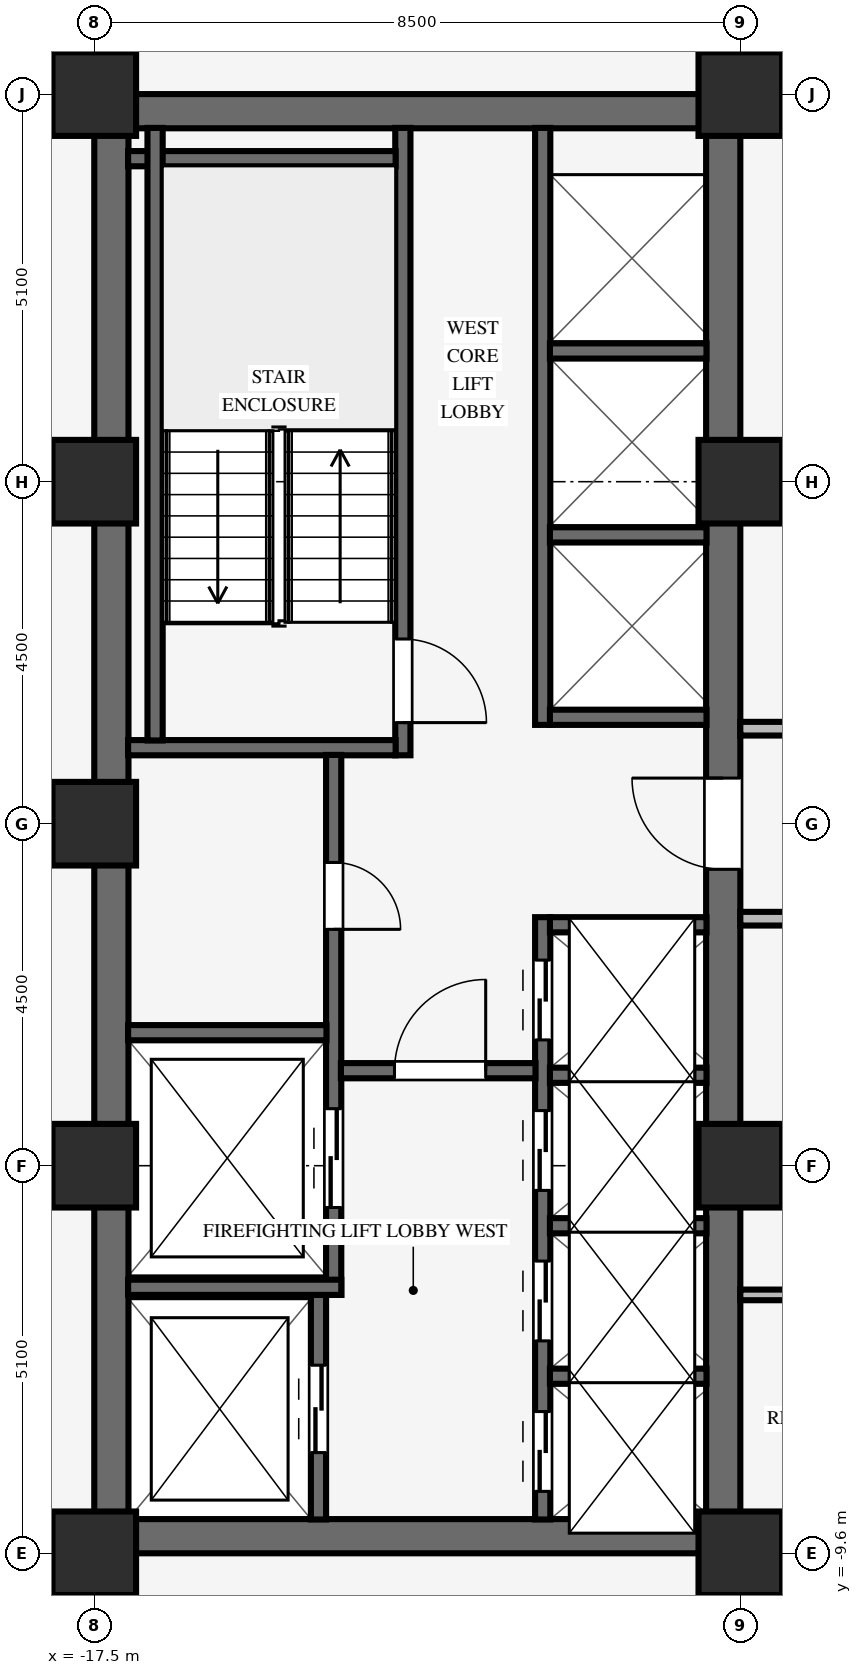
"""IFC4 building model, lengths in metres.
Left out: names, types, materials, properties, quantities, classifications, styles, units other than length and angle.
Written with IfcOpenShell. Run it as: python <this file> out.ifc"""

import sys

from ifc_helpers import new_model, si_unit, direction, frame, frame_2d, origin, origin_2d, place, context, subcontext, project, spatial, rectangle, extrude, source, transform, mapped, element, fill, save


model = new_model("IFC4")
c1 = context("Model", 3, precision=1e-05, world=origin(), true_north=direction((0.0, 1.0)))
c2 = subcontext(c1, "Body", "Model", "MODEL_VIEW")
j1 = project(units=[si_unit("LENGTHUNIT", "METRE"), si_unit("PLANEANGLEUNIT", "RADIAN")], contexts=[c1])
p1 = place(None, origin())
s1 = spatial("IfcSite", under=j1, at=p1, CompositionType="ELEMENT")
p2 = place(p1, origin())
s2 = spatial("IfcBuilding", under=s1, at=p2, CompositionType="ELEMENT")
p3 = place(p2, frame((0.0, 0.0, 56.8)))
s3 = spatial("IfcBuildingStorey", under=s2, at=p3, CompositionType="ELEMENT", Elevation=56.8)
for number, where, z_axis, x_axis in (
    (1, (-17.5, -9.375, 0.0), (0.0, 0.0, 1.0), (1.0, 0.0, 0.0)),
    (2, (-17.5, 9.375, 0.0), (0.0, 0.0, 1.0), (1.0, 0.0, 0.0)),
):
    element("IfcWall", number, at=place(p3, frame(where, z_axis=z_axis, x_axis=x_axis)), inside=s3, PredefinedType="SHEAR", context=c2, shape_type="SweptSolid", body=[
        extrude(rectangle(XDim=8.5, YDim=0.45, at=frame_2d((4.25, 0.0))), origin(), (0.0, 0.0, 1.0), 3.37),
    ])
p4 = place(p3, frame((-17.275, -9.155, 0.0), z_axis=(0.0, 0.0, 1.0), x_axis=(0.0, 1.0, 0.0)))
e3 = element("IfcWall", 3, at=p4, inside=s3, PredefinedType="SHEAR", context=c2, shape_type="SweptSolid", body=[
    extrude(rectangle(XDim=18.31, YDim=0.45, at=frame_2d((9.155, 0.0))), origin(), (0.0, 0.0, 1.0), 3.37),
])
p5 = place(p3, frame((-9.225, -9.155, 0.0), z_axis=(0.0, 0.0, 1.0), x_axis=(0.0, 1.0, 0.0)))
e4 = element("IfcWall", 4, at=p5, inside=s3, PredefinedType="SHEAR", context=c2, shape_type="SweptSolid", body=[
    extrude(rectangle(XDim=18.31, YDim=0.45, at=frame_2d((9.155, 0.0))), origin(), (0.0, 0.0, 1.0), 3.37),
])
p6 = place(p5, frame((8.555, 0.0, 0.0)))
e5 = element("IfcOpeningElement", 5, at=p6, cuts=e4, PredefinedType="OPENING", context=c2, shape_type="SweptSolid", body=[
    extrude(rectangle(XDim=1.2, YDim=2.15, at=frame_2d((0.6, 1.075))), frame((0.0, 0.235, 0.0), z_axis=(0.0, -1.0, 0.0), x_axis=(1.0, 0.0, 0.0)), (0.0, 0.0, 1.0), 0.47),
])
for number, where, z_axis, x_axis in (
    (6, (-17.5, -9.6, 0.0), (0.0, 0.0, 1.0), (1.0, 0.0, 0.0)),
    (7, (-17.5, -4.5, 0.0), (0.0, 0.0, 1.0), (1.0, 0.0, 0.0)),
    (8, (-17.5, 4.5, 0.0), (0.0, 0.0, 1.0), (1.0, 0.0, 0.0)),
    (9, (-17.5, 9.6, 0.0), (0.0, 0.0, 1.0), (1.0, 0.0, 0.0)),
    (10, (-9.0, -9.6, 0.0), (0.0, 0.0, 1.0), (1.0, 0.0, 0.0)),
    (11, (-9.0, -4.5, 0.0), (0.0, 0.0, 1.0), (1.0, 0.0, 0.0)),
    (12, (-9.0, 4.5, 0.0), (0.0, 0.0, 1.0), (1.0, 0.0, 0.0)),
    (13, (-9.0, 9.6, 0.0), (0.0, 0.0, 1.0), (1.0, 0.0, 0.0)),
    (14, (-17.5, 0.0, 0.0), (0.0, 0.0, 1.0), (1.0, 0.0, 0.0)),
):
    element("IfcColumn", number, at=place(p3, frame(where, z_axis=z_axis, x_axis=x_axis)), inside=s3, PredefinedType="COLUMN", context=c2, shape_type="SweptSolid", body=[
        extrude(rectangle(XDim=1.1, YDim=1.1, at=origin_2d()), origin(), (0.0, 0.0, 1.0), 3.37),
    ])
p7 = place(p3, frame((-13.44, 0.9, 0.0), z_axis=(0.0, 0.0, 1.0), x_axis=(0.0, 1.0, 0.0)))
e15 = element("IfcWall", 15, at=p7, inside=s3, PredefinedType="SHEAR", context=c2, shape_type="SweptSolid", body=[
    extrude(rectangle(XDim=8.255, YDim=0.2, at=frame_2d((4.127, 0.0))), origin(), (0.0, 0.0, 1.0), 3.37),
])
p8 = place(p7, frame((1.53, 0.0, 0.0), z_axis=(0.0, 0.0, 1.0), x_axis=(-1.0, 0.0, 0.0)))
e16 = element("IfcOpeningElement", 16, at=p8, cuts=e15, PredefinedType="OPENING", context=c2, shape_type="SweptSolid", body=[
    extrude(rectangle(XDim=1.1, YDim=2.15, at=frame_2d((0.55, 1.075))), frame((0.0, 0.11, 0.0), z_axis=(0.0, -1.0, 0.0), x_axis=(1.0, 0.0, 0.0)), (0.0, 0.0, 1.0), 0.22),
])
for number, where, z_axis, x_axis in (
    (17, (-17.055, 1.0, 0.0), (0.0, 0.0, 1.0), (1.0, 0.0, 0.0)),
    (18, (-17.055, 8.75, 0.0), (0.0, 0.0, 1.0), (1.0, 0.0, 0.0)),
):
    element("IfcWall", number, at=place(p3, frame(where, z_axis=z_axis, x_axis=x_axis)), inside=s3, PredefinedType="SHEAR", context=c2, shape_type="SweptSolid", body=[
        extrude(rectangle(XDim=3.52, YDim=0.2, at=frame_2d((1.76, 0.0))), origin(), (0.0, 0.0, 1.0), 3.37),
    ])
p9 = place(p3, frame((-16.7, 1.095, 0.0), z_axis=(0.0, 0.0, 1.0), x_axis=(0.0, 1.0, 0.0)))
e19 = element("IfcWall", 19, at=p9, inside=s3, PredefinedType="SHEAR", context=c2, shape_type="SweptSolid", body=[
    extrude(rectangle(XDim=8.06, YDim=0.2, at=frame_2d((4.03, 0.0))), origin(), (0.0, 0.0, 1.0), 3.37),
])
p10 = place(p3, frame((-14.55, -9.155, 0.0), z_axis=(0.0, 0.0, 1.0), x_axis=(0.0, 1.0, 0.0)))
e20 = element("IfcWall", 20, at=p10, inside=s3, PredefinedType="SHEAR", context=c2, shape_type="SweptSolid", body=[
    extrude(rectangle(XDim=2.96, YDim=0.2, at=frame_2d((1.48, 0.0))), origin(), (0.0, 0.0, 1.0), 3.37),
])
p11 = place(p10, frame((0.88, 0.0, 0.0)))
e21 = element("IfcOpeningElement", 21, at=p11, cuts=e20, PredefinedType="OPENING", context=c2, shape_type="SweptSolid", body=[
    extrude(rectangle(XDim=1.15, YDim=2.15, at=frame_2d((0.575, 1.075))), frame((0.0, 0.11, 0.0), z_axis=(0.0, -1.0, 0.0), x_axis=(1.0, 0.0, 0.0)), (0.0, 0.0, 1.0), 0.22),
])
p12 = place(p3, frame((-14.35, -6.2, 0.0), z_axis=(0.0, 0.0, 1.0), x_axis=(0.0, 1.0, 0.0)))
e22 = element("IfcWall", 22, at=p12, inside=s3, PredefinedType="SHEAR", context=c2, shape_type="SweptSolid", body=[
    extrude(rectangle(XDim=7.105, YDim=0.2, at=frame_2d((3.552, 0.0))), origin(), (0.0, 0.0, 1.0), 3.37),
])
p13 = place(p12, frame((5.69, 0.0, 0.0), z_axis=(0.0, 0.0, 1.0), x_axis=(-1.0, 0.0, 0.0)))
e23 = element("IfcOpeningElement", 23, at=p13, cuts=e22, PredefinedType="OPENING", context=c2, shape_type="SweptSolid", body=[
    extrude(rectangle(XDim=0.88, YDim=2.1, at=frame_2d((0.44, 1.05))), frame((0.0, 0.11, 0.0), z_axis=(0.0, -1.0, 0.0), x_axis=(1.0, 0.0, 0.0)), (0.0, 0.0, 1.0), 0.22),
])
p14 = place(p12, frame((1.15, 0.0, 0.0)))
e24 = element("IfcOpeningElement", 24, at=p14, cuts=e22, PredefinedType="OPENING", context=c2, shape_type="SweptSolid", body=[
    extrude(rectangle(XDim=1.3, YDim=2.2, at=frame_2d((0.65, 1.1))), frame((0.0, 0.11, 0.0), z_axis=(0.0, -1.0, 0.0), x_axis=(1.0, 0.0, 0.0)), (0.0, 0.0, 1.0), 0.22),
])
p15 = place(p3, frame((-17.055, -6.1, 0.0), z_axis=(0.0, 0.0, 1.0), x_axis=(1.0, 0.0, 0.0)))
e25 = element("IfcWall", 25, at=p15, inside=s3, PredefinedType="SHEAR", context=c2, shape_type="SweptSolid", body=[
    extrude(rectangle(XDim=2.805, YDim=0.2, at=frame_2d((1.402, 0.0))), origin(), (0.0, 0.0, 1.0), 3.37),
])
p16 = place(p3, frame((-17.055, -2.75, 0.0), z_axis=(0.0, 0.0, 1.0), x_axis=(1.0, 0.0, 0.0)))
e26 = element("IfcWall", 26, at=p16, inside=s3, PredefinedType="SHEAR", context=c2, shape_type="SweptSolid", body=[
    extrude(rectangle(XDim=2.61, YDim=0.2, at=frame_2d((1.305, 0.0))), origin(), (0.0, 0.0, 1.0), 3.37),
])
p17 = place(p3, frame((-11.6, -9.155, 0.0), z_axis=(0.0, 0.0, 1.0), x_axis=(0.0, 1.0, 0.0)))
e27 = element("IfcWall", 27, at=p17, inside=s3, PredefinedType="SHEAR", context=c2, shape_type="SweptSolid", body=[
    extrude(rectangle(XDim=7.925, YDim=0.2, at=frame_2d((3.962, 0.0))), origin(), (0.0, 0.0, 1.0), 3.37),
])
p18 = place(p17, frame((0.37, 0.0, 0.0)))
e28 = element("IfcOpeningElement", 28, at=p18, cuts=e27, PredefinedType="OPENING", context=c2, shape_type="SweptSolid", body=[
    extrude(rectangle(XDim=1.05, YDim=2.15, at=frame_2d((0.525, 1.075))), frame((0.0, 0.11, 0.0), z_axis=(0.0, -1.0, 0.0), x_axis=(1.0, 0.0, 0.0)), (0.0, 0.0, 1.0), 0.22),
])
p19 = place(p17, frame((2.35, 0.0, 0.0)))
e29 = element("IfcOpeningElement", 29, at=p19, cuts=e27, PredefinedType="OPENING", context=c2, shape_type="SweptSolid", body=[
    extrude(rectangle(XDim=1.05, YDim=2.15, at=frame_2d((0.525, 1.075))), frame((0.0, 0.11, 0.0), z_axis=(0.0, -1.0, 0.0), x_axis=(1.0, 0.0, 0.0)), (0.0, 0.0, 1.0), 0.22),
])
p20 = place(p17, frame((4.33, 0.0, 0.0)))
e30 = element("IfcOpeningElement", 30, at=p20, cuts=e27, PredefinedType="OPENING", context=c2, shape_type="SweptSolid", body=[
    extrude(rectangle(XDim=1.05, YDim=2.15, at=frame_2d((0.525, 1.075))), frame((0.0, 0.11, 0.0), z_axis=(0.0, -1.0, 0.0), x_axis=(1.0, 0.0, 0.0)), (0.0, 0.0, 1.0), 0.22),
])
p21 = place(p17, frame((6.31, 0.0, 0.0)))
e31 = element("IfcOpeningElement", 31, at=p21, cuts=e27, PredefinedType="OPENING", context=c2, shape_type="SweptSolid", body=[
    extrude(rectangle(XDim=1.05, YDim=2.15, at=frame_2d((0.525, 1.075))), frame((0.0, 0.11, 0.0), z_axis=(0.0, -1.0, 0.0), x_axis=(1.0, 0.0, 0.0)), (0.0, 0.0, 1.0), 0.22),
])
p22 = place(p3, frame((-14.255, -3.25, 0.0), z_axis=(0.0, 0.0, 1.0), x_axis=(1.0, 0.0, 0.0)))
e32 = element("IfcWall", 32, at=p22, inside=s3, PredefinedType="SHEAR", context=c2, shape_type="SweptSolid", body=[
    extrude(rectangle(XDim=2.56, YDim=0.2, at=frame_2d((1.28, 0.0))), origin(), (0.0, 0.0, 1.0), 3.37),
])
p23 = place(p22, frame((0.705, 0.0, 0.0)))
e33 = element("IfcOpeningElement", 33, at=p23, cuts=e32, PredefinedType="OPENING", context=c2, shape_type="SweptSolid", body=[
    extrude(rectangle(XDim=1.2, YDim=2.15, at=frame_2d((0.6, 1.075))), frame((0.0, 0.11, 0.0), z_axis=(0.0, -1.0, 0.0), x_axis=(1.0, 0.0, 0.0)), (0.0, 0.0, 1.0), 0.22),
])
for number, where, z_axis, x_axis in (
    (34, (-11.505, -7.27, 0.0), (0.0, 0.0, 1.0), (1.0, 0.0, 0.0)),
    (35, (-11.505, -5.29, 0.0), (0.0, 0.0, 1.0), (1.0, 0.0, 0.0)),
    (36, (-11.505, -3.31, 0.0), (0.0, 0.0, 1.0), (1.0, 0.0, 0.0)),
    (37, (-11.505, -1.33, 0.0), (0.0, 0.0, 1.0), (1.0, 0.0, 0.0)),
):
    element("IfcWall", number, at=place(p3, frame(where, z_axis=z_axis, x_axis=x_axis)), inside=s3, PredefinedType="SHEAR", context=c2, shape_type="SweptSolid", body=[
        extrude(rectangle(XDim=2.06, YDim=0.2, at=frame_2d((1.03, 0.0))), origin(), (0.0, 0.0, 1.0), 3.37),
    ])
p24 = place(p3, frame((-11.6, 1.3, 0.0), z_axis=(0.0, 0.0, 1.0), x_axis=(0.0, 1.0, 0.0)))
e38 = element("IfcWall", 38, at=p24, inside=s3, PredefinedType="SHEAR", context=c2, shape_type="SweptSolid", body=[
    extrude(rectangle(XDim=7.855, YDim=0.2, at=frame_2d((3.927, 0.0))), origin(), (0.0, 0.0, 1.0), 3.37),
])
for number, where, z_axis, x_axis in (
    (39, (-11.505, 1.4, 0.0), (0.0, 0.0, 1.0), (1.0, 0.0, 0.0)),
    (40, (-11.505, 3.8, 0.0), (0.0, 0.0, 1.0), (1.0, 0.0, 0.0)),
    (41, (-11.505, 6.22, 0.0), (0.0, 0.0, 1.0), (1.0, 0.0, 0.0)),
):
    element("IfcWall", number, at=place(p3, frame(where, z_axis=z_axis, x_axis=x_axis)), inside=s3, PredefinedType="SHEAR", context=c2, shape_type="SweptSolid", body=[
        extrude(rectangle(XDim=2.06, YDim=0.2, at=frame_2d((1.03, 0.0))), origin(), (0.0, 0.0, 1.0), 3.37),
    ])
p25 = place(p3, frame((-8.454, -9.6, 0.0), z_axis=(0.0, 0.0, 1.0), x_axis=(1.0, 0.0, 0.0)))
e42 = element("IfcWall", 42, at=p25, inside=s3, PredefinedType="PARTITIONING", context=c2, shape_type="SweptSolid", body=[
    extrude(rectangle(XDim=5.254, YDim=0.18, at=frame_2d((2.627, 0.0))), origin(), (0.0, 0.0, 1.0), 2.405),
])
p26 = place(p25, frame((2.147, 0.0, 0.0)))
e43 = element("IfcOpeningElement", 43, at=p26, cuts=e42, PredefinedType="OPENING", context=c2, shape_type="SweptSolid", body=[
    extrude(rectangle(XDim=0.96, YDim=2.1, at=frame_2d((0.48, 1.05))), frame((0.0, 0.1, 0.0), z_axis=(0.0, -1.0, 0.0), x_axis=(1.0, 0.0, 0.0)), (0.0, 0.0, 1.0), 0.2),
])
p27 = place(p3, frame((-9.0, -6.2, 0.0), z_axis=(0.0, 0.0, 1.0), x_axis=(1.0, 0.0, 0.0)))
e44 = element("IfcWall", 44, at=p27, inside=s3, PredefinedType="PARTITIONING", context=c2, shape_type="SweptSolid", body=[
    extrude(rectangle(XDim=5.714, YDim=0.14, at=frame_2d((2.857, 0.0))), origin(), (0.0, 0.0, 1.0), 3.36),
])
p28 = place(p3, frame((-9.0, -1.25, 0.0), z_axis=(0.0, 0.0, 1.0), x_axis=(1.0, 0.0, 0.0)))
e45 = element("IfcWall", 45, at=p28, inside=s3, PredefinedType="PARTITIONING", context=c2, shape_type="SweptSolid", body=[
    extrude(rectangle(XDim=5.8, YDim=0.18, at=frame_2d((2.9, 0.0))), origin(), (0.0, 0.0, 1.0), 3.36),
])
p29 = place(p28, frame((2.42, 0.0, 0.0)))
e46 = element("IfcOpeningElement", 46, at=p29, cuts=e45, PredefinedType="OPENING", context=c2, shape_type="SweptSolid", body=[
    extrude(rectangle(XDim=0.96, YDim=2.1, at=frame_2d((0.48, 1.05))), frame((0.0, 0.1, 0.0), z_axis=(0.0, -1.0, 0.0), x_axis=(1.0, 0.0, 0.0)), (0.0, 0.0, 1.0), 0.2),
])
p30 = place(p3, frame((-9.0, 1.25, 0.0), z_axis=(0.0, 0.0, 1.0), x_axis=(1.0, 0.0, 0.0)))
e47 = element("IfcWall", 47, at=p30, inside=s3, PredefinedType="PARTITIONING", context=c2, shape_type="SweptSolid", body=[
    extrude(rectangle(XDim=5.8, YDim=0.18, at=frame_2d((2.9, 0.0))), origin(), (0.0, 0.0, 1.0), 3.36),
])
p31 = place(p3, frame((-8.454, 9.6, 0.0), z_axis=(0.0, 0.0, 1.0), x_axis=(1.0, 0.0, 0.0)))
e48 = element("IfcWall", 48, at=p31, inside=s3, PredefinedType="PARTITIONING", context=c2, shape_type="SweptSolid", body=[
    extrude(rectangle(XDim=5.254, YDim=0.18, at=frame_2d((2.627, 0.0))), origin(), (0.0, 0.0, 1.0), 2.405),
])
for number, where, z_axis, x_axis in (
    (49, (-17.5, -11.114, 0.0), (0.0, 0.0, 1.0), (0.0, 1.0, 0.0)),
    (50, (-17.5, 10.146, 0.0), (0.0, 0.0, 1.0), (0.0, 1.0, 0.0)),
):
    element("IfcWall", number, at=place(p3, frame(where, z_axis=z_axis, x_axis=x_axis)), inside=s3, PredefinedType="PARTITIONING", context=c2, shape_type="SweptSolid", body=[
        extrude(rectangle(XDim=0.968, YDim=0.18, at=frame_2d((0.484, 0.0))), origin(), (0.0, 0.0, 1.0), 2.738),
    ])
m1 = source(origin(), c2, "Body", "SweptSolid", [
    extrude(rectangle(XDim=1.1, YDim=2.15, at=frame_2d((0.55, 1.075))), frame((0.0, 0.025, 0.0), z_axis=(0.0, -1.0, 0.0), x_axis=(1.0, 0.0, 0.0)), (0.0, 0.0, 1.0), 0.05),
])
p32 = place(p8, origin())
e51 = element("IfcDoor", 51, at=p32, inside=s3, OperationType="SINGLE_SWING_RIGHT", PredefinedType="DOOR", context=c2, shape_type="MappedRepresentation", body=[
    mapped(m1, transform((0.0, 0.0, 0.0), scale=1.0)),
])
fill(e16, e51)
m2 = source(origin(), c2, "Body", "SweptSolid", [
    extrude(rectangle(XDim=0.88, YDim=2.1, at=frame_2d((0.44, 1.05))), frame((0.0, 0.025, 0.0), z_axis=(0.0, -1.0, 0.0), x_axis=(1.0, 0.0, 0.0)), (0.0, 0.0, 1.0), 0.05),
])
p33 = place(p13, origin())
e52 = element("IfcDoor", 52, at=p33, inside=s3, OperationType="SINGLE_SWING_RIGHT", PredefinedType="DOOR", context=c2, shape_type="MappedRepresentation", body=[
    mapped(m2, transform((0.0, 0.0, 0.0), scale=1.0)),
])
fill(e23, e52)
m3 = source(origin(), c2, "Body", "SweptSolid", [
    extrude(rectangle(XDim=1.2, YDim=2.15, at=frame_2d((0.6, 1.075))), frame((0.0, 0.025, 0.0), z_axis=(0.0, -1.0, 0.0), x_axis=(1.0, 0.0, 0.0)), (0.0, 0.0, 1.0), 0.05),
])
p34 = place(p23, origin())
e53 = element("IfcDoor", 53, at=p34, inside=s3, OperationType="SINGLE_SWING_RIGHT", PredefinedType="DOOR", context=c2, shape_type="MappedRepresentation", body=[
    mapped(m3, transform((0.0, 0.0, 0.0), scale=1.0)),
])
fill(e33, e53)
p35 = place(p6, origin())
e54 = element("IfcDoor", 54, at=p35, inside=s3, OperationType="SINGLE_SWING_RIGHT", PredefinedType="DOOR", context=c2, shape_type="MappedRepresentation", body=[
    mapped(m3, transform((0.0, 0.0, 0.0), scale=1.0)),
])
fill(e5, e54)
m4 = source(origin(), c2, "Body", "SweptSolid", [
    extrude(rectangle(XDim=1.15, YDim=2.15, at=frame_2d((0.575, 1.075))), frame((0.0, 0.025, 0.0), z_axis=(0.0, -1.0, 0.0), x_axis=(1.0, 0.0, 0.0)), (0.0, 0.0, 1.0), 0.05),
])
p36 = place(p11, origin())
e55 = element("IfcDoor", 55, at=p36, inside=s3, OperationType="DOUBLE_DOOR_SLIDING", PredefinedType="DOOR", context=c2, shape_type="MappedRepresentation", body=[
    mapped(m4, transform((0.0, 0.0, 0.0), scale=1.0)),
])
fill(e21, e55)
m5 = source(origin(), c2, "Body", "SweptSolid", [
    extrude(rectangle(XDim=1.3, YDim=2.2, at=frame_2d((0.65, 1.1))), frame((0.0, 0.025, 0.0), z_axis=(0.0, -1.0, 0.0), x_axis=(1.0, 0.0, 0.0)), (0.0, 0.0, 1.0), 0.05),
])
p37 = place(p14, origin())
e56 = element("IfcDoor", 56, at=p37, inside=s3, OperationType="DOUBLE_DOOR_SLIDING", PredefinedType="DOOR", context=c2, shape_type="MappedRepresentation", body=[
    mapped(m5, transform((0.0, 0.0, 0.0), scale=1.0)),
])
fill(e24, e56)
m6 = source(origin(), c2, "Body", "SweptSolid", [
    extrude(rectangle(XDim=1.05, YDim=2.15, at=frame_2d((0.525, 1.075))), frame((0.0, 0.025, 0.0), z_axis=(0.0, -1.0, 0.0), x_axis=(1.0, 0.0, 0.0)), (0.0, 0.0, 1.0), 0.05),
])
p38 = place(p18, origin())
e57 = element("IfcDoor", 57, at=p38, inside=s3, OperationType="DOUBLE_DOOR_SLIDING", PredefinedType="DOOR", context=c2, shape_type="MappedRepresentation", body=[
    mapped(m6, transform((0.0, 0.0, 0.0), scale=1.0)),
])
fill(e28, e57)
p39 = place(p19, origin())
e58 = element("IfcDoor", 58, at=p39, inside=s3, OperationType="DOUBLE_DOOR_SLIDING", PredefinedType="DOOR", context=c2, shape_type="MappedRepresentation", body=[
    mapped(m6, transform((0.0, 0.0, 0.0), scale=1.0)),
])
fill(e29, e58)
p40 = place(p20, origin())
e59 = element("IfcDoor", 59, at=p40, inside=s3, OperationType="DOUBLE_DOOR_SLIDING", PredefinedType="DOOR", context=c2, shape_type="MappedRepresentation", body=[
    mapped(m6, transform((0.0, 0.0, 0.0), scale=1.0)),
])
fill(e30, e59)
p41 = place(p21, origin())
e60 = element("IfcDoor", 60, at=p41, inside=s3, OperationType="DOUBLE_DOOR_SLIDING", PredefinedType="DOOR", context=c2, shape_type="MappedRepresentation", body=[
    mapped(m6, transform((0.0, 0.0, 0.0), scale=1.0)),
])
fill(e31, e60)
save(model, sys.argv[1])
